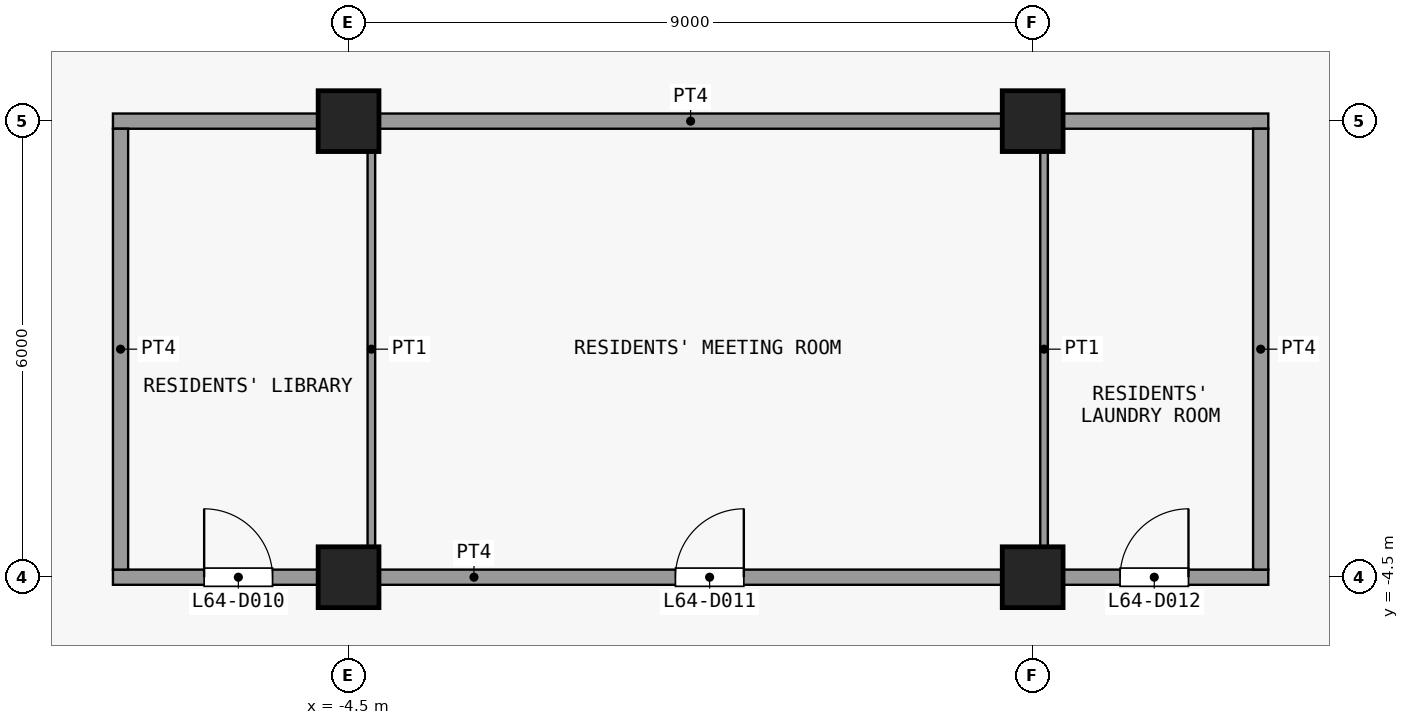
"""IFC4 building model, lengths in metres.
Left out: names, types, materials, properties, quantities, classifications, styles, units other than length and angle.
Written with IfcOpenShell. Run it as: python <this file> out.ifc"""

import sys

from ifc_helpers import new_model, si_unit, direction, frame, frame_2d, origin, origin_2d, place, context, subcontext, project, spatial, rectangle, extrude, element, fill, save


model = new_model("IFC4")
c1 = context("Model", 3, precision=1e-05, world=origin(), true_north=direction((0.0, 1.0)))
c2 = subcontext(c1, "Body", "Model", "MODEL_VIEW")
j1 = project(units=[si_unit("LENGTHUNIT", "METRE"), si_unit("PLANEANGLEUNIT", "RADIAN")], contexts=[c1])
p1 = place(None, origin())
s1 = spatial("IfcSite", under=j1, at=p1, CompositionType="ELEMENT")
p2 = place(p1, origin())
s2 = spatial("IfcBuilding", under=s1, at=p2, CompositionType="ELEMENT")
p3 = place(p2, frame((0.0, 0.0, 255.5)))
s3 = spatial("IfcBuildingStorey", under=s2, at=p3, CompositionType="ELEMENT", Elevation=255.5)
for number, where, z_axis, x_axis in (
    (1, (-4.5, -4.5, 0.0), (0.0, 0.0, 1.0), (1.0, 0.0, 0.0)),
    (2, (-4.5, 1.5, 0.0), (0.0, 0.0, 1.0), (1.0, 0.0, 0.0)),
    (3, (4.5, -4.5, 0.0), (0.0, 0.0, 1.0), (1.0, 0.0, 0.0)),
    (4, (4.5, 1.5, 0.0), (0.0, 0.0, 1.0), (1.0, 0.0, 0.0)),
):
    element("IfcColumn", number, at=place(p3, frame(where, z_axis=z_axis, x_axis=x_axis)), inside=s3, PredefinedType="COLUMN", context=c2, shape_type="SweptSolid", body=[
        extrude(rectangle(XDim=0.8, YDim=0.8, at=origin_2d()), origin(), (0.0, 0.0, 1.0), 3.6),
    ])
p4 = place(p3, frame((-7.6, -4.5, 0.0), z_axis=(0.0, 0.0, 1.0), x_axis=(1.0, 0.0, 0.0)))
e5 = element("IfcWall", 5, at=p4, inside=s3, PredefinedType="PARTITIONING", context=c2, shape_type="SweptSolid", body=[
    extrude(rectangle(XDim=15.2, YDim=0.2, at=frame_2d((7.6, 0.0))), origin(), (0.0, 0.0, 1.0), 3.3),
])
p5 = place(p4, frame((1.2, 0.0, 0.0)))
e6 = element("IfcOpeningElement", 6, at=p5, cuts=e5, PredefinedType="OPENING", context=c2, shape_type="SweptSolid", body=[
    extrude(rectangle(XDim=0.9, YDim=2.1, at=frame_2d((0.45, 1.05))), frame((0.0, 0.11, 0.0), z_axis=(0.0, -1.0, 0.0), x_axis=(1.0, 0.0, 0.0)), (0.0, 0.0, 1.0), 0.22),
])
p6 = place(p4, frame((7.4, 0.0, 0.0)))
e7 = element("IfcOpeningElement", 7, at=p6, cuts=e5, PredefinedType="OPENING", context=c2, shape_type="SweptSolid", body=[
    extrude(rectangle(XDim=0.9, YDim=2.1, at=frame_2d((0.45, 1.05))), frame((0.0, 0.11, 0.0), z_axis=(0.0, -1.0, 0.0), x_axis=(1.0, 0.0, 0.0)), (0.0, 0.0, 1.0), 0.22),
])
p7 = place(p4, frame((13.25, 0.0, 0.0)))
e8 = element("IfcOpeningElement", 8, at=p7, cuts=e5, PredefinedType="OPENING", context=c2, shape_type="SweptSolid", body=[
    extrude(rectangle(XDim=0.9, YDim=2.1, at=frame_2d((0.45, 1.05))), frame((0.0, 0.11, 0.0), z_axis=(0.0, -1.0, 0.0), x_axis=(1.0, 0.0, 0.0)), (0.0, 0.0, 1.0), 0.22),
])
p8 = place(p3, frame((-7.6, 1.5, 0.0), z_axis=(0.0, 0.0, 1.0), x_axis=(1.0, 0.0, 0.0)))
e9 = element("IfcWall", 9, at=p8, inside=s3, PredefinedType="PARTITIONING", context=c2, shape_type="SweptSolid", body=[
    extrude(rectangle(XDim=15.2, YDim=0.2, at=frame_2d((7.6, 0.0))), origin(), (0.0, 0.0, 1.0), 3.3),
])
p9 = place(p3, frame((-7.5, -4.4, 0.0), z_axis=(0.0, 0.0, 1.0), x_axis=(0.0, 1.0, 0.0)))
e10 = element("IfcWall", 10, at=p9, inside=s3, PredefinedType="PARTITIONING", context=c2, shape_type="SweptSolid", body=[
    extrude(rectangle(XDim=5.8, YDim=0.2, at=frame_2d((2.9, 0.0))), origin(), (0.0, 0.0, 1.0), 3.3),
])
for number, where, z_axis, x_axis in (
    (11, (-4.2, -4.4, 0.0), (0.0, 0.0, 1.0), (0.0, 1.0, 0.0)),
    (12, (4.65, -4.4, 0.0), (0.0, 0.0, 1.0), (0.0, 1.0, 0.0)),
):
    element("IfcWall", number, at=place(p3, frame(where, z_axis=z_axis, x_axis=x_axis)), inside=s3, PredefinedType="PARTITIONING", context=c2, shape_type="SweptSolid", body=[
        extrude(rectangle(XDim=5.8, YDim=0.1, at=frame_2d((2.9, 0.0))), origin(), (0.0, 0.0, 1.0), 3.3),
    ])
p10 = place(p3, frame((7.5, -4.4, 0.0), z_axis=(0.0, 0.0, 1.0), x_axis=(0.0, 1.0, 0.0)))
e13 = element("IfcWall", 13, at=p10, inside=s3, PredefinedType="PARTITIONING", context=c2, shape_type="SweptSolid", body=[
    extrude(rectangle(XDim=5.8, YDim=0.2, at=frame_2d((2.9, 0.0))), origin(), (0.0, 0.0, 1.0), 3.3),
])
p11 = place(p5, origin())
e14 = element("IfcDoor", 14, at=p11, inside=s3, OperationType="SINGLE_SWING_RIGHT", PredefinedType="DOOR", context=c2, shape_type="SweptSolid", body=[
    extrude(rectangle(XDim=0.9, YDim=2.1, at=frame_2d((0.45, 1.05))), frame((0.0, 0.025, 0.0), z_axis=(0.0, -1.0, 0.0), x_axis=(1.0, 0.0, 0.0)), (0.0, 0.0, 1.0), 0.05),
])
fill(e6, e14)
p12 = place(p6, origin())
e15 = element("IfcDoor", 15, at=p12, inside=s3, OperationType="SINGLE_SWING_LEFT", PredefinedType="DOOR", context=c2, shape_type="SweptSolid", body=[
    extrude(rectangle(XDim=0.9, YDim=2.1, at=frame_2d((0.45, 1.05))), frame((0.0, 0.025, 0.0), z_axis=(0.0, -1.0, 0.0), x_axis=(1.0, 0.0, 0.0)), (0.0, 0.0, 1.0), 0.05),
])
fill(e7, e15)
p13 = place(p7, origin())
e16 = element("IfcDoor", 16, at=p13, inside=s3, OperationType="SINGLE_SWING_LEFT", PredefinedType="DOOR", context=c2, shape_type="SweptSolid", body=[
    extrude(rectangle(XDim=0.9, YDim=2.1, at=frame_2d((0.45, 1.05))), frame((0.0, 0.025, 0.0), z_axis=(0.0, -1.0, 0.0), x_axis=(1.0, 0.0, 0.0)), (0.0, 0.0, 1.0), 0.05),
])
fill(e8, e16)
save(model, sys.argv[1])
